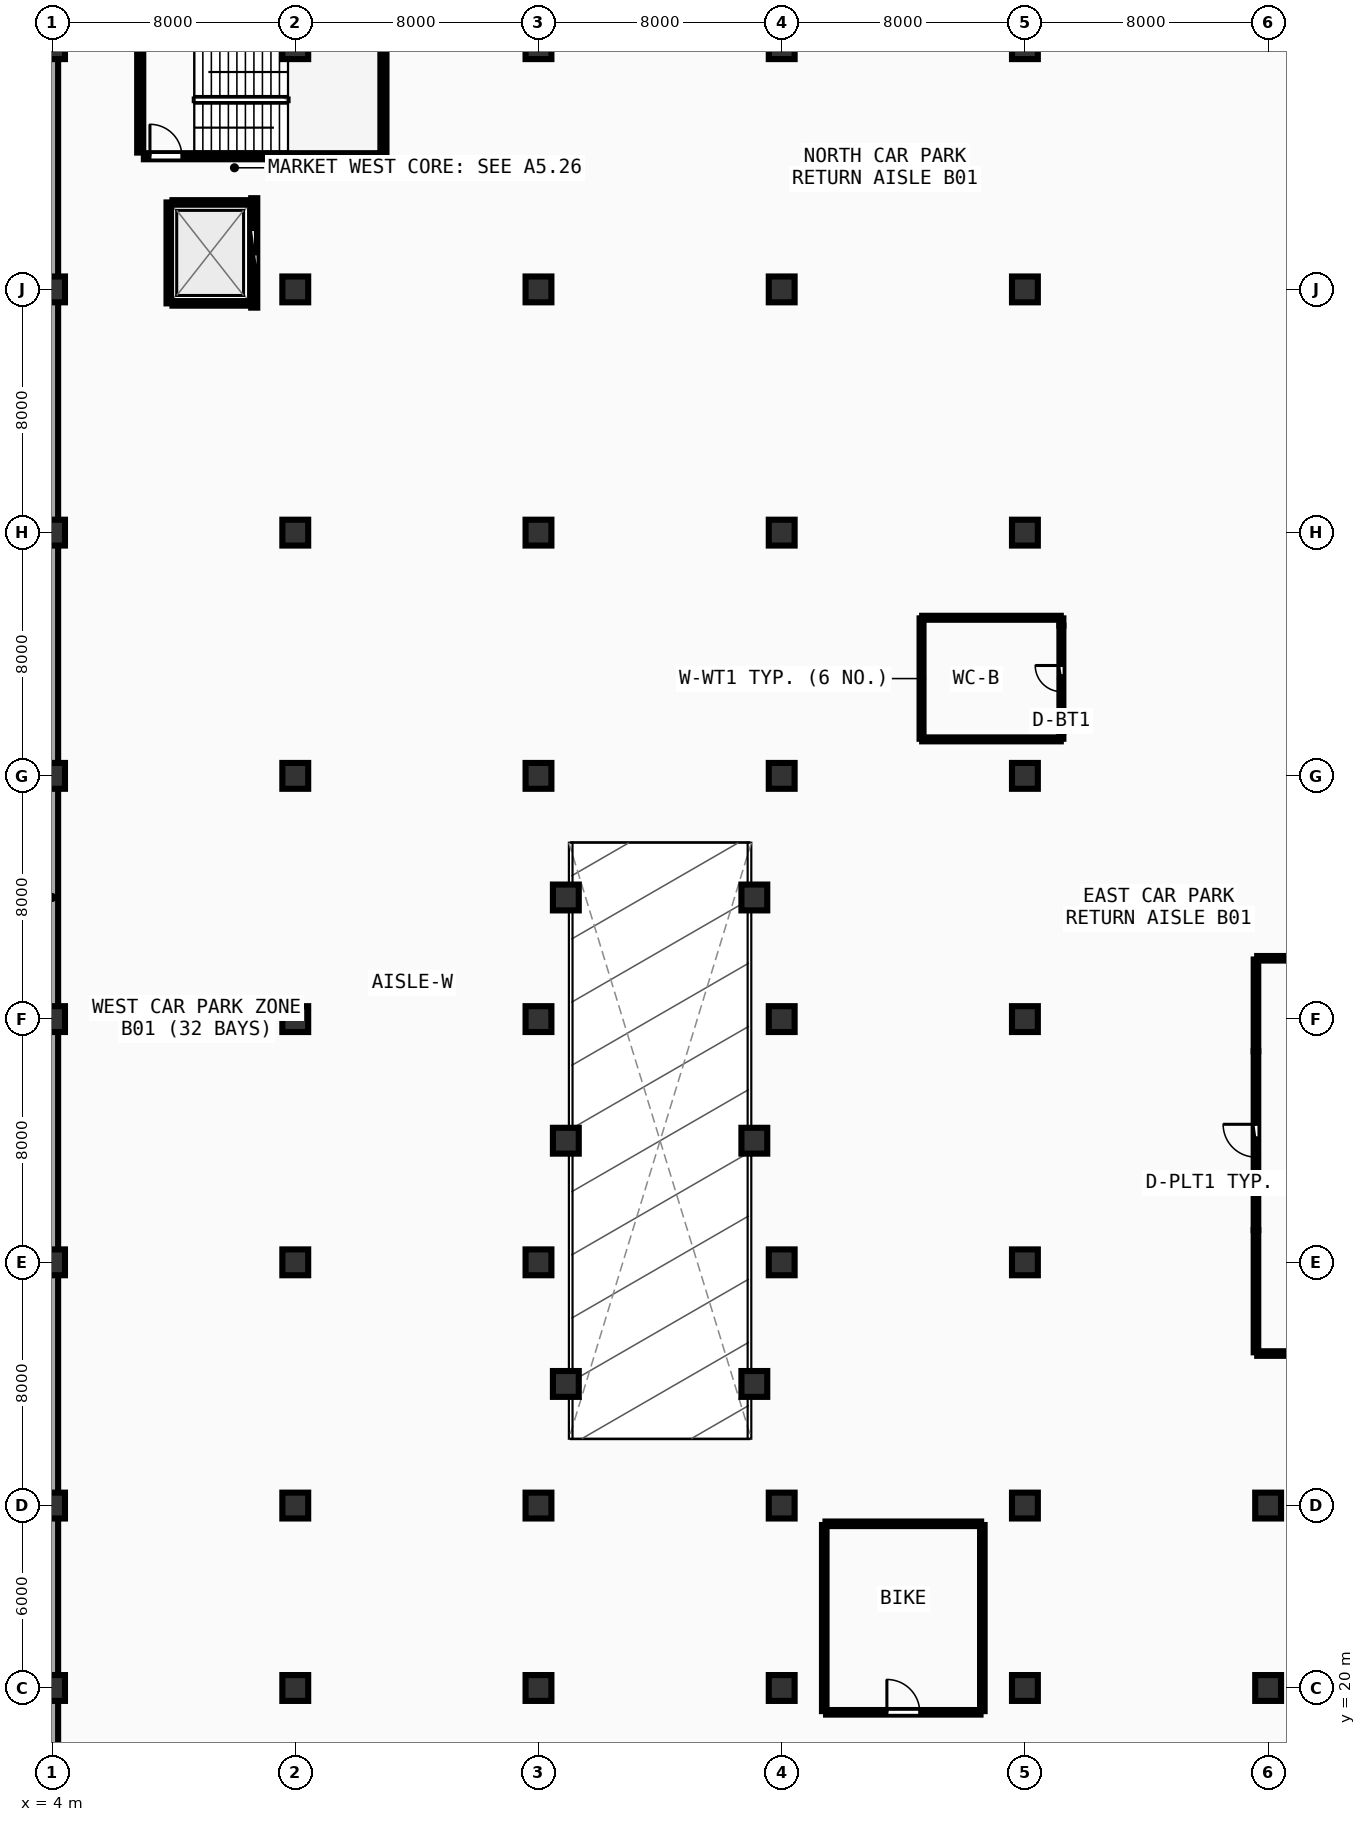
"""IFC4 building model, lengths in metres.
Left out: names, types, materials, properties, quantities, classifications, styles, units other than length and angle.
Written with IfcOpenShell. Run it as: python <this file> out.ifc"""

import sys

from ifc_helpers import new_model, si_unit, direction, frame, frame_2d, origin, origin_2d, place, context, subcontext, project, spatial, rectangle, extrude, element, fill, save


model = new_model("IFC4")
c1 = context("Model", 3, precision=1e-05, world=origin(), true_north=direction((0.0, 1.0)))
c2 = subcontext(c1, "Body", "Model", "MODEL_VIEW")
j1 = project(units=[si_unit("LENGTHUNIT", "METRE"), si_unit("PLANEANGLEUNIT", "RADIAN")], contexts=[c1])
p1 = place(None, origin())
s1 = spatial("IfcSite", under=j1, at=p1, CompositionType="ELEMENT")
p2 = place(p1, origin())
s2 = spatial("IfcBuilding", under=s1, at=p2, CompositionType="ELEMENT")
p3 = place(p2, frame((0.0, 0.0, -4.2)))
s3 = spatial("IfcBuildingStorey", under=s2, at=p3, CompositionType="ELEMENT", Elevation=-4.2)
for number, where, z_axis, x_axis in (
    (1, (4.0, 20.0, 0.0), (0.0, 0.0, 1.0), (1.0, 0.0, 0.0)),
    (2, (4.0, 26.0, 0.0), (0.0, 0.0, 1.0), (1.0, 0.0, 0.0)),
    (3, (4.0, 34.0, 0.0), (0.0, 0.0, 1.0), (1.0, 0.0, 0.0)),
    (4, (4.0, 42.0, 0.0), (0.0, 0.0, 1.0), (1.0, 0.0, 0.0)),
    (5, (4.0, 50.0, 0.0), (0.0, 0.0, 1.0), (1.0, 0.0, 0.0)),
    (6, (4.0, 58.0, 0.0), (0.0, 0.0, 1.0), (1.0, 0.0, 0.0)),
    (7, (4.0, 66.0, 0.0), (0.0, 0.0, 1.0), (1.0, 0.0, 0.0)),
    (8, (4.0, 74.0, 0.0), (0.0, 0.0, 1.0), (1.0, 0.0, 0.0)),
    (9, (12.0, 20.0, 0.0), (0.0, 0.0, 1.0), (1.0, 0.0, 0.0)),
    (10, (12.0, 26.0, 0.0), (0.0, 0.0, 1.0), (1.0, 0.0, 0.0)),
    (11, (12.0, 34.0, 0.0), (0.0, 0.0, 1.0), (1.0, 0.0, 0.0)),
    (12, (12.0, 42.0, 0.0), (0.0, 0.0, 1.0), (1.0, 0.0, 0.0)),
    (13, (12.0, 50.0, 0.0), (0.0, 0.0, 1.0), (1.0, 0.0, 0.0)),
    (14, (12.0, 58.0, 0.0), (0.0, 0.0, 1.0), (1.0, 0.0, 0.0)),
    (15, (12.0, 66.0, 0.0), (0.0, 0.0, 1.0), (1.0, 0.0, 0.0)),
    (16, (12.0, 74.0, 0.0), (0.0, 0.0, 1.0), (1.0, 0.0, 0.0)),
    (17, (20.0, 20.0, 0.0), (0.0, 0.0, 1.0), (1.0, 0.0, 0.0)),
    (18, (20.0, 26.0, 0.0), (0.0, 0.0, 1.0), (1.0, 0.0, 0.0)),
    (19, (20.0, 34.0, 0.0), (0.0, 0.0, 1.0), (1.0, 0.0, 0.0)),
    (20, (20.0, 42.0, 0.0), (0.0, 0.0, 1.0), (1.0, 0.0, 0.0)),
    (21, (20.0, 50.0, 0.0), (0.0, 0.0, 1.0), (1.0, 0.0, 0.0)),
    (22, (20.0, 58.0, 0.0), (0.0, 0.0, 1.0), (1.0, 0.0, 0.0)),
    (23, (20.0, 66.0, 0.0), (0.0, 0.0, 1.0), (1.0, 0.0, 0.0)),
    (24, (20.0, 74.0, 0.0), (0.0, 0.0, 1.0), (1.0, 0.0, 0.0)),
    (25, (28.0, 20.0, 0.0), (0.0, 0.0, 1.0), (1.0, 0.0, 0.0)),
    (26, (28.0, 26.0, 0.0), (0.0, 0.0, 1.0), (1.0, 0.0, 0.0)),
    (27, (28.0, 34.0, 0.0), (0.0, 0.0, 1.0), (1.0, 0.0, 0.0)),
    (28, (28.0, 42.0, 0.0), (0.0, 0.0, 1.0), (1.0, 0.0, 0.0)),
    (29, (28.0, 50.0, 0.0), (0.0, 0.0, 1.0), (1.0, 0.0, 0.0)),
    (30, (28.0, 58.0, 0.0), (0.0, 0.0, 1.0), (1.0, 0.0, 0.0)),
    (31, (28.0, 66.0, 0.0), (0.0, 0.0, 1.0), (1.0, 0.0, 0.0)),
    (32, (28.0, 74.0, 0.0), (0.0, 0.0, 1.0), (1.0, 0.0, 0.0)),
    (33, (36.0, 20.0, 0.0), (0.0, 0.0, 1.0), (1.0, 0.0, 0.0)),
    (34, (36.0, 26.0, 0.0), (0.0, 0.0, 1.0), (1.0, 0.0, 0.0)),
    (35, (36.0, 34.0, 0.0), (0.0, 0.0, 1.0), (1.0, 0.0, 0.0)),
    (36, (36.0, 42.0, 0.0), (0.0, 0.0, 1.0), (1.0, 0.0, 0.0)),
    (37, (36.0, 50.0, 0.0), (0.0, 0.0, 1.0), (1.0, 0.0, 0.0)),
    (38, (36.0, 58.0, 0.0), (0.0, 0.0, 1.0), (1.0, 0.0, 0.0)),
    (39, (36.0, 66.0, 0.0), (0.0, 0.0, 1.0), (1.0, 0.0, 0.0)),
    (40, (36.0, 74.0, 0.0), (0.0, 0.0, 1.0), (1.0, 0.0, 0.0)),
    (41, (44.0, 20.0, 0.0), (0.0, 0.0, 1.0), (1.0, 0.0, 0.0)),
    (42, (44.0, 26.0, 0.0), (0.0, 0.0, 1.0), (1.0, 0.0, 0.0)),
    (43, (20.9, 46.0, 0.0), (0.0, 0.0, 1.0), (1.0, 0.0, 0.0)),
    (44, (27.1, 46.0, 0.0), (0.0, 0.0, 1.0), (1.0, 0.0, 0.0)),
    (45, (20.9, 38.0, 0.0), (0.0, 0.0, 1.0), (1.0, 0.0, 0.0)),
    (46, (27.1, 38.0, 0.0), (0.0, 0.0, 1.0), (1.0, 0.0, 0.0)),
    (47, (20.9, 30.0, 0.0), (0.0, 0.0, 1.0), (1.0, 0.0, 0.0)),
    (48, (27.1, 30.0, 0.0), (0.0, 0.0, 1.0), (1.0, 0.0, 0.0)),
):
    element("IfcColumn", number, at=place(p3, frame(where, z_axis=z_axis, x_axis=x_axis)), inside=s3, PredefinedType="COLUMN", context=c2, shape_type="SweptSolid", body=[
        extrude(rectangle(XDim=0.85, YDim=0.85, at=origin_2d()), origin(), (0.0, 0.0, 1.0), 4.2),
    ])
p4 = place(p3, frame((4.0, 87.45, 0.0), z_axis=(0.0, 0.0, 1.0), x_axis=(0.0, -1.0, 0.0)))
e49 = element("IfcWall", 49, at=p4, inside=s3, PredefinedType="USERDEFINED", context=c2, shape_type="SweptSolid", body=[
    extrude(rectangle(XDim=82.9, YDim=0.4, at=frame_2d((41.45, 0.0))), origin(), (0.0, 0.0, 1.0), 3.9),
])
p5 = place(p3, frame((7.02, 70.38, 0.0), z_axis=(0.0, 0.0, 1.0), x_axis=(1.0, 0.0, 0.0)))
e50 = element("IfcWall", 50, at=p5, inside=s3, PredefinedType="SHEAR", context=c2, shape_type="SweptSolid", body=[
    extrude(rectangle(XDim=7.76, YDim=0.2, at=frame_2d((3.88, 0.0))), origin(), (0.0, 0.0, 1.0), 3.88),
])
p6 = place(p5, frame((0.2, 0.0, 0.0)))
e51 = element("IfcOpeningElement", 51, at=p6, cuts=e50, PredefinedType="OPENING", context=c2, shape_type="SweptSolid", body=[
    extrude(rectangle(XDim=1.05, YDim=2.1, at=frame_2d((0.525, 1.05))), frame((0.0, 0.11, 0.0), z_axis=(0.0, -1.0, 0.0), x_axis=(1.0, 0.0, 0.0)), (0.0, 0.0, 1.0), 0.22),
])
for number, where, z_axis, x_axis in (
    (52, (14.9, 70.5, 0.0), (0.0, 0.0, 1.0), (0.0, 1.0, 0.0)),
    (53, (6.9, 73.97, 0.0), (0.0, 0.0, 1.0), (0.0, -1.0, 0.0)),
):
    element("IfcWall", number, at=place(p3, frame(where, z_axis=z_axis, x_axis=x_axis)), inside=s3, PredefinedType="SHEAR", context=c2, shape_type="SweptSolid", body=[
        extrude(rectangle(XDim=3.47, YDim=0.2, at=frame_2d((1.735, 0.0))), origin(), (0.0, 0.0, 1.0), 3.88),
    ])
p7 = place(p3, frame((10.65, 65.4, 0.0), z_axis=(0.0, 0.0, 1.0), x_axis=(0.0, 1.0, 0.0)))
e54 = element("IfcWall", 54, at=p7, inside=s3, PredefinedType="SOLIDWALL", context=c2, shape_type="SweptSolid", body=[
    extrude(rectangle(XDim=3.6, YDim=0.2, at=frame_2d((1.8, 0.0))), origin(), (0.0, 0.0, 1.0), 2.685),
])
p8 = place(p7, frame((1.02, 0.0, 0.0)))
e55 = element("IfcOpeningElement", 55, at=p8, cuts=e54, PredefinedType="OPENING", context=c2, shape_type="SweptSolid", body=[
    extrude(rectangle(XDim=1.55, YDim=2.2, at=frame_2d((0.775, 1.1))), frame((0.0, 0.11, 0.0), z_axis=(0.0, -1.0, 0.0), x_axis=(1.0, 0.0, 0.0)), (0.0, 0.0, 1.0), 0.22),
])
p9 = place(p3, frame((7.84, 65.54, 0.0), z_axis=(0.0, 0.0, 1.0), x_axis=(0.0, 1.0, 0.0)))
e56 = element("IfcWall", 56, at=p9, inside=s3, PredefinedType="PARTITIONING", context=c2, shape_type="SweptSolid", body=[
    extrude(rectangle(XDim=3.32, YDim=0.15, at=frame_2d((1.66, 0.0))), origin(), (0.0, 0.0, 1.0), 2.685),
])
for number, where, z_axis, x_axis in (
    (57, (7.96, 65.54, 0.0), (0.0, 0.0, 1.0), (1.0, 0.0, 0.0)),
    (58, (7.96, 68.86, 0.0), (0.0, 0.0, 1.0), (1.0, 0.0, 0.0)),
):
    element("IfcWall", number, at=place(p3, frame(where, z_axis=z_axis, x_axis=x_axis)), inside=s3, PredefinedType="PARTITIONING", context=c2, shape_type="SweptSolid", body=[
        extrude(rectangle(XDim=2.56, YDim=0.15, at=frame_2d((1.28, 0.0))), origin(), (0.0, 0.0, 1.0), 3.87),
    ])
p10 = place(p3, frame((29.46, 19.2, 0.0), z_axis=(0.0, 0.0, 1.0), x_axis=(1.0, 0.0, 0.0)))
e59 = element("IfcWall", 59, at=p10, inside=s3, PredefinedType="PARTITIONING", context=c2, shape_type="SweptSolid", body=[
    extrude(rectangle(XDim=5.08, YDim=0.15, at=frame_2d((2.54, 0.0))), origin(), (0.0, 0.0, 1.0), 3.89),
])
p11 = place(p10, frame((2.0, 0.0, 0.0)))
e60 = element("IfcOpeningElement", 60, at=p11, cuts=e59, PredefinedType="OPENING", context=c2, shape_type="SweptSolid", body=[
    extrude(rectangle(XDim=1.08, YDim=2.1, at=frame_2d((0.54, 1.05))), frame((0.0, 0.085, 0.0), z_axis=(0.0, -1.0, 0.0), x_axis=(1.0, 0.0, 0.0)), (0.0, 0.0, 1.0), 0.17),
])
p12 = place(p3, frame((43.6, 35.06, 0.0), z_axis=(0.0, 0.0, 1.0), x_axis=(0.0, 1.0, 0.0)))
e61 = element("IfcWall", 61, at=p12, inside=s3, PredefinedType="PARTITIONING", context=c2, shape_type="SweptSolid", body=[
    extrude(rectangle(XDim=5.88, YDim=0.15, at=frame_2d((2.94, 0.0))), origin(), (0.0, 0.0, 1.0), 3.89),
])
p13 = place(p12, frame((2.4, 0.0, 0.0)))
e62 = element("IfcOpeningElement", 62, at=p13, cuts=e61, PredefinedType="OPENING", context=c2, shape_type="SweptSolid", body=[
    extrude(rectangle(XDim=1.08, YDim=2.1, at=frame_2d((0.54, 1.05))), frame((0.0, 0.085, 0.0), z_axis=(0.0, -1.0, 0.0), x_axis=(1.0, 0.0, 0.0)), (0.0, 0.0, 1.0), 0.17),
])
p14 = place(p3, frame((37.2, 51.46, 0.0), z_axis=(0.0, 0.0, 1.0), x_axis=(0.0, 1.0, 0.0)))
e63 = element("IfcWall", 63, at=p14, inside=s3, PredefinedType="PLUMBINGWALL", context=c2, shape_type="SweptSolid", body=[
    extrude(rectangle(XDim=3.48, YDim=0.13, at=frame_2d((1.74, 0.0))), origin(), (0.0, 0.0, 1.0), 3.89),
])
p15 = place(p14, frame((1.31, 0.0, 0.0)))
e64 = element("IfcOpeningElement", 64, at=p15, cuts=e63, PredefinedType="OPENING", context=c2, shape_type="SweptSolid", body=[
    extrude(rectangle(XDim=0.86, YDim=2.05, at=frame_2d((0.43, 1.025))), frame((0.0, 0.075, 0.0), z_axis=(0.0, -1.0, 0.0), x_axis=(1.0, 0.0, 0.0)), (0.0, 0.0, 1.0), 0.15),
])
p16 = place(p3, frame((34.6, 19.24, 0.0), z_axis=(0.0, 0.0, 1.0), x_axis=(0.0, 1.0, 0.0)))
e65 = element("IfcWall", 65, at=p16, inside=s3, PredefinedType="PARTITIONING", context=c2, shape_type="SweptSolid", body=[
    extrude(rectangle(XDim=6.12, YDim=0.15, at=frame_2d((3.06, 0.0))), origin(), (0.0, 0.0, 1.0), 2.685),
])
p17 = place(p3, frame((34.56, 25.4, 0.0), z_axis=(0.0, 0.0, 1.0), x_axis=(-1.0, 0.0, 0.0)))
e66 = element("IfcWall", 66, at=p17, inside=s3, PredefinedType="PARTITIONING", context=c2, shape_type="SweptSolid", body=[
    extrude(rectangle(XDim=5.12, YDim=0.15, at=frame_2d((2.56, 0.0))), origin(), (0.0, 0.0, 1.0), 3.89),
])
p18 = place(p3, frame((29.4, 25.36, 0.0), z_axis=(0.0, 0.0, 1.0), x_axis=(0.0, -1.0, 0.0)))
e67 = element("IfcWall", 67, at=p18, inside=s3, PredefinedType="PARTITIONING", context=c2, shape_type="SweptSolid", body=[
    extrude(rectangle(XDim=6.12, YDim=0.15, at=frame_2d((3.06, 0.0))), origin(), (0.0, 0.0, 1.0), 2.685),
])
p19 = place(p3, frame((43.64, 31.0, 0.0), z_axis=(0.0, 0.0, 1.0), x_axis=(1.0, 0.0, 0.0)))
e68 = element("IfcWall", 68, at=p19, inside=s3, PredefinedType="PARTITIONING", context=c2, shape_type="SweptSolid", body=[
    extrude(rectangle(XDim=15.92, YDim=0.15, at=frame_2d((7.96, 0.0))), origin(), (0.0, 0.0, 1.0), 3.89),
])
p20 = place(p3, frame((59.56, 44.0, 0.0), z_axis=(0.0, 0.0, 1.0), x_axis=(-1.0, 0.0, 0.0)))
e69 = element("IfcWall", 69, at=p20, inside=s3, PredefinedType="PARTITIONING", context=c2, shape_type="SweptSolid", body=[
    extrude(rectangle(XDim=15.92, YDim=0.15, at=frame_2d((7.96, 0.0))), origin(), (0.0, 0.0, 1.0), 3.285),
])
p21 = place(p3, frame((43.6, 43.96, 0.0), z_axis=(0.0, 0.0, 1.0), x_axis=(0.0, -1.0, 0.0)))
e70 = element("IfcWall", 70, at=p21, inside=s3, PredefinedType="PARTITIONING", context=c2, shape_type="SweptSolid", body=[
    extrude(rectangle(XDim=3.02, YDim=0.15, at=frame_2d((1.51, 0.0))), origin(), (0.0, 0.0, 1.0), 3.89),
])
p22 = place(p3, frame((43.6, 35.06, 0.0), z_axis=(0.0, 0.0, 1.0), x_axis=(0.0, -1.0, 0.0)))
e71 = element("IfcWall", 71, at=p22, inside=s3, PredefinedType="PARTITIONING", context=c2, shape_type="SweptSolid", body=[
    extrude(rectangle(XDim=4.02, YDim=0.15, at=frame_2d((2.01, 0.0))), origin(), (0.0, 0.0, 1.0), 3.89),
])
p23 = place(p3, frame((32.62, 51.2, 0.0), z_axis=(0.0, 0.0, 1.0), x_axis=(1.0, 0.0, 0.0)))
e72 = element("IfcWall", 72, at=p23, inside=s3, PredefinedType="PLUMBINGWALL", context=c2, shape_type="SweptSolid", body=[
    extrude(rectangle(XDim=4.56, YDim=0.13, at=frame_2d((2.28, 0.0))), origin(), (0.0, 0.0, 1.0), 2.685),
])
for number, where, z_axis, x_axis in (
    (73, (37.2, 51.22, 0.0), (0.0, 0.0, 1.0), (0.0, 1.0, 0.0)),
    (74, (37.2, 54.94, 0.0), (0.0, 0.0, 1.0), (0.0, 1.0, 0.0)),
):
    element("IfcWall", number, at=place(p3, frame(where, z_axis=z_axis, x_axis=x_axis)), inside=s3, PredefinedType="PLUMBINGWALL", context=c2, shape_type="SweptSolid", body=[
        extrude(rectangle(XDim=0.24, YDim=0.13, at=frame_2d((0.12, 0.0))), origin(), (0.0, 0.0, 1.0), 3.89),
    ])
p24 = place(p3, frame((37.18, 55.2, 0.0), z_axis=(0.0, 0.0, 1.0), x_axis=(-1.0, 0.0, 0.0)))
e75 = element("IfcWall", 75, at=p24, inside=s3, PredefinedType="PLUMBINGWALL", context=c2, shape_type="SweptSolid", body=[
    extrude(rectangle(XDim=4.56, YDim=0.13, at=frame_2d((2.28, 0.0))), origin(), (0.0, 0.0, 1.0), 2.685),
])
p25 = place(p3, frame((32.6, 55.18, 0.0), z_axis=(0.0, 0.0, 1.0), x_axis=(0.0, -1.0, 0.0)))
e76 = element("IfcWall", 76, at=p25, inside=s3, PredefinedType="PLUMBINGWALL", context=c2, shape_type="SweptSolid", body=[
    extrude(rectangle(XDim=3.96, YDim=0.13, at=frame_2d((1.98, 0.0))), origin(), (0.0, 0.0, 1.0), 3.89),
])
p26 = place(p6, origin())
e77 = element("IfcDoor", 77, at=p26, inside=s3, OperationType="SINGLE_SWING_LEFT", PredefinedType="DOOR", context=c2, shape_type="SweptSolid", body=[
    extrude(rectangle(XDim=1.05, YDim=2.1, at=frame_2d((0.525, 1.05))), frame((0.0, 0.025, 0.0), z_axis=(0.0, -1.0, 0.0), x_axis=(1.0, 0.0, 0.0)), (0.0, 0.0, 1.0), 0.05),
])
fill(e51, e77)
p27 = place(p8, origin())
e78 = element("IfcDoor", 78, at=p27, inside=s3, OperationType="DOUBLE_DOOR_SLIDING", PredefinedType="DOOR", context=c2, shape_type="SweptSolid", body=[
    extrude(rectangle(XDim=1.55, YDim=2.2, at=frame_2d((0.775, 1.1))), frame((0.0, 0.025, 0.0), z_axis=(0.0, -1.0, 0.0), x_axis=(1.0, 0.0, 0.0)), (0.0, 0.0, 1.0), 0.05),
])
fill(e55, e78)
p28 = place(p11, origin())
e79 = element("IfcDoor", 79, at=p28, inside=s3, OperationType="SINGLE_SWING_LEFT", PredefinedType="DOOR", context=c2, shape_type="SweptSolid", body=[
    extrude(rectangle(XDim=1.08, YDim=2.1, at=frame_2d((0.54, 1.05))), frame((0.0, 0.025, 0.0), z_axis=(0.0, -1.0, 0.0), x_axis=(1.0, 0.0, 0.0)), (0.0, 0.0, 1.0), 0.05),
])
fill(e60, e79)
p29 = place(p13, origin())
e80 = element("IfcDoor", 80, at=p29, inside=s3, OperationType="SINGLE_SWING_RIGHT", PredefinedType="DOOR", context=c2, shape_type="SweptSolid", body=[
    extrude(rectangle(XDim=1.08, YDim=2.1, at=frame_2d((0.54, 1.05))), frame((0.0, 0.025, 0.0), z_axis=(0.0, -1.0, 0.0), x_axis=(1.0, 0.0, 0.0)), (0.0, 0.0, 1.0), 0.05),
])
fill(e62, e80)
p30 = place(p15, origin())
e81 = element("IfcDoor", 81, at=p30, inside=s3, OperationType="SINGLE_SWING_RIGHT", PredefinedType="DOOR", context=c2, shape_type="SweptSolid", body=[
    extrude(rectangle(XDim=0.86, YDim=2.05, at=frame_2d((0.43, 1.025))), frame((0.0, 0.025, 0.0), z_axis=(0.0, -1.0, 0.0), x_axis=(1.0, 0.0, 0.0)), (0.0, 0.0, 1.0), 0.05),
])
fill(e64, e81)
save(model, sys.argv[1])
